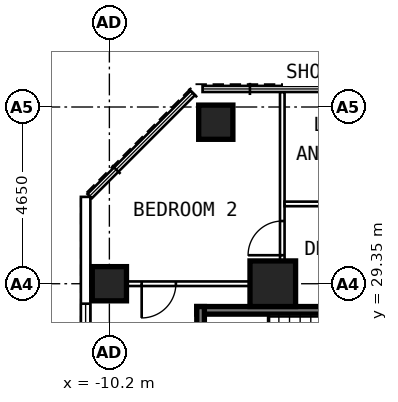
"""IFC4 building model, lengths in metres.
Left out: names, types, materials, properties, quantities, classifications, styles, units other than length and angle.
Written with IfcOpenShell. Run it as: python <this file> out.ifc"""

import sys

from ifc_helpers import new_model, si_unit, direction, frame, frame_2d, origin, origin_2d, place, context, subcontext, project, spatial, rectangle, extrude, element, fill, save


model = new_model("IFC4")
c1 = context("Model", 3, precision=1e-05, world=origin(), true_north=direction((0.0, 1.0)))
c2 = subcontext(c1, "Body", "Model", "MODEL_VIEW")
j1 = project(units=[si_unit("LENGTHUNIT", "METRE"), si_unit("PLANEANGLEUNIT", "RADIAN")], contexts=[c1])
p1 = place(None, origin())
s1 = spatial("IfcSite", under=j1, at=p1, CompositionType="ELEMENT")
p2 = place(p1, origin())
s2 = spatial("IfcBuilding", under=s1, at=p2, CompositionType="ELEMENT")
p3 = place(p2, frame((0.0, 0.0, 106.0)))
s3 = spatial("IfcBuildingStorey", under=s2, at=p3, CompositionType="ELEMENT", Elevation=106.0)
for number, where, z_axis, x_axis in (
    (1, (-10.2, 29.35, 0.0), (0.0, 0.0, 1.0), (0.0, 1.0, 0.0)),
    (2, (-7.4, 33.6, 0.0), (0.0, 0.0, 1.0), (0.0, 1.0, 0.0)),
):
    element("IfcColumn", number, at=place(p3, frame(where, z_axis=z_axis, x_axis=x_axis)), inside=s3, PredefinedType="COLUMN", context=c2, shape_type="SweptSolid", body=[
        extrude(rectangle(XDim=0.9, YDim=0.9, at=origin_2d()), origin(), (0.0, 0.0, 1.0), 3.6),
    ])
p4 = place(p3, frame((-5.9, 29.35, 0.0), z_axis=(0.0, 0.0, 1.0), x_axis=(0.0, 1.0, 0.0)))
e3 = element("IfcColumn", 3, at=p4, inside=s3, PredefinedType="COLUMN", context=c2, shape_type="SweptSolid", body=[
    extrude(rectangle(XDim=1.2, YDim=1.2, at=origin_2d()), origin(), (0.0, 0.0, 1.0), 3.6),
])
p5 = place(p3, frame((-10.825, 6.148, 0.0), z_axis=(0.0, 0.0, 1.0), x_axis=(0.0, 1.0, 0.0)))
e4 = element("IfcWall", 4, at=p5, inside=s3, PredefinedType="SOLIDWALL", context=c2, shape_type="SweptSolid", body=[
    extrude(rectangle(XDim=25.487, YDim=0.25, at=frame_2d((12.744, 0.0))), origin(), (0.0, 0.0, 1.0), 3.35),
])
p6 = place(p5, frame((0.927, 0.0, 0.8)))
e5 = element("IfcOpeningElement", 5, at=p6, cuts=e4, PredefinedType="OPENING", context=c2, shape_type="SweptSolid", body=[
    extrude(rectangle(XDim=1.8, YDim=1.8, at=frame_2d((0.9, 0.9))), frame((0.0, 0.137, 0.0), z_axis=(0.0, -1.0, 0.0), x_axis=(1.0, 0.0, 0.0)), (0.0, 0.0, 1.0), 0.274),
])
p7 = place(p5, frame((3.777, 0.0, 0.8)))
e6 = element("IfcOpeningElement", 6, at=p7, cuts=e4, PredefinedType="OPENING", context=c2, shape_type="SweptSolid", body=[
    extrude(rectangle(XDim=1.8, YDim=1.8, at=frame_2d((0.9, 0.9))), frame((0.0, 0.137, 0.0), z_axis=(0.0, -1.0, 0.0), x_axis=(1.0, 0.0, 0.0)), (0.0, 0.0, 1.0), 0.274),
])
p8 = place(p5, frame((6.627, 0.0, 0.8)))
e7 = element("IfcOpeningElement", 7, at=p8, cuts=e4, PredefinedType="OPENING", context=c2, shape_type="SweptSolid", body=[
    extrude(rectangle(XDim=1.8, YDim=1.8, at=frame_2d((0.9, 0.9))), frame((0.0, 0.137, 0.0), z_axis=(0.0, -1.0, 0.0), x_axis=(1.0, 0.0, 0.0)), (0.0, 0.0, 1.0), 0.274),
])
p9 = place(p5, frame((9.477, 0.0, 0.8)))
e8 = element("IfcOpeningElement", 8, at=p9, cuts=e4, PredefinedType="OPENING", context=c2, shape_type="SweptSolid", body=[
    extrude(rectangle(XDim=1.8, YDim=1.8, at=frame_2d((0.9, 0.9))), frame((0.0, 0.137, 0.0), z_axis=(0.0, -1.0, 0.0), x_axis=(1.0, 0.0, 0.0)), (0.0, 0.0, 1.0), 0.274),
])
p10 = place(p5, frame((12.327, 0.0, 0.8)))
e9 = element("IfcOpeningElement", 9, at=p10, cuts=e4, PredefinedType="OPENING", context=c2, shape_type="SweptSolid", body=[
    extrude(rectangle(XDim=1.8, YDim=1.8, at=frame_2d((0.9, 0.9))), frame((0.0, 0.137, 0.0), z_axis=(0.0, -1.0, 0.0), x_axis=(1.0, 0.0, 0.0)), (0.0, 0.0, 1.0), 0.274),
])
p11 = place(p5, frame((15.177, 0.0, 0.8)))
e10 = element("IfcOpeningElement", 10, at=p11, cuts=e4, PredefinedType="OPENING", context=c2, shape_type="SweptSolid", body=[
    extrude(rectangle(XDim=1.8, YDim=1.8, at=frame_2d((0.9, 0.9))), frame((0.0, 0.137, 0.0), z_axis=(0.0, -1.0, 0.0), x_axis=(1.0, 0.0, 0.0)), (0.0, 0.0, 1.0), 0.274),
])
p12 = place(p5, frame((18.027, 0.0, 0.8)))
e11 = element("IfcOpeningElement", 11, at=p12, cuts=e4, PredefinedType="OPENING", context=c2, shape_type="SweptSolid", body=[
    extrude(rectangle(XDim=1.8, YDim=1.8, at=frame_2d((0.9, 0.9))), frame((0.0, 0.137, 0.0), z_axis=(0.0, -1.0, 0.0), x_axis=(1.0, 0.0, 0.0)), (0.0, 0.0, 1.0), 0.274),
])
p13 = place(p5, frame((20.877, 0.0, 0.8)))
e12 = element("IfcOpeningElement", 12, at=p13, cuts=e4, PredefinedType="OPENING", context=c2, shape_type="SweptSolid", body=[
    extrude(rectangle(XDim=1.8, YDim=1.8, at=frame_2d((0.9, 0.9))), frame((0.0, 0.137, 0.0), z_axis=(0.0, -1.0, 0.0), x_axis=(1.0, 0.0, 0.0)), (0.0, 0.0, 1.0), 0.274),
])
p14 = place(p3, frame((-5.71, 29.35, 0.0), z_axis=(0.0, 0.0, 1.0), x_axis=(-1.0, 0.0, 0.0)))
e13 = element("IfcWall", 13, at=p14, inside=s3, PredefinedType="PARTITIONING", context=c2, shape_type="SweptSolid", body=[
    extrude(rectangle(XDim=4.99, YDim=0.12, at=frame_2d((2.495, 0.0))), origin(), (0.0, 0.0, 1.0), 2.45),
])
p15 = place(p14, frame((2.74, 0.0, 0.0)))
e14 = element("IfcOpeningElement", 14, at=p15, cuts=e13, PredefinedType="OPENING", context=c2, shape_type="SweptSolid", body=[
    extrude(rectangle(XDim=0.9, YDim=2.1, at=frame_2d((0.45, 1.05))), frame((0.0, 0.072, 0.0), z_axis=(0.0, -1.0, 0.0), x_axis=(1.0, 0.0, 0.0)), (0.0, 0.0, 1.0), 0.144),
])
p16 = place(p3, frame((-5.65, 28.95, 0.0), z_axis=(0.0, 0.0, 1.0), x_axis=(0.0, 1.0, 0.0)))
e15 = element("IfcWall", 15, at=p16, inside=s3, PredefinedType="PARTITIONING", context=c2, shape_type="SweptSolid", body=[
    extrude(rectangle(XDim=5.445, YDim=0.12, at=frame_2d((2.723, 0.0))), origin(), (0.0, 0.0, 1.0), 3.35),
])
p17 = place(p16, frame((1.15, 0.0, 0.0)))
e16 = element("IfcOpeningElement", 16, at=p17, cuts=e15, PredefinedType="OPENING", context=c2, shape_type="SweptSolid", body=[
    extrude(rectangle(XDim=0.9, YDim=2.1, at=frame_2d((0.45, 1.05))), frame((0.0, 0.072, 0.0), z_axis=(0.0, -1.0, 0.0), x_axis=(1.0, 0.0, 0.0)), (0.0, 0.0, 1.0), 0.144),
])
p18 = place(p3, frame((-2.1, 31.45, 0.0), z_axis=(0.0, 0.0, 1.0), x_axis=(-1.0, 0.0, 0.0)))
e17 = element("IfcWall", 17, at=p18, inside=s3, PredefinedType="PARTITIONING", context=c2, shape_type="SweptSolid", body=[
    extrude(rectangle(XDim=3.49, YDim=0.12, at=frame_2d((1.745, 0.0))), origin(), (0.0, 0.0, 1.0), 3.35),
])
p19 = place(p18, frame((1.345, 0.0, 0.0)))
e18 = element("IfcOpeningElement", 18, at=p19, cuts=e17, PredefinedType="OPENING", context=c2, shape_type="SweptSolid", body=[
    extrude(rectangle(XDim=0.8, YDim=2.1, at=frame_2d((0.4, 1.05))), frame((0.0, 0.072, 0.0), z_axis=(0.0, -1.0, 0.0), x_axis=(1.0, 0.0, 0.0)), (0.0, 0.0, 1.0), 0.144),
])
p20 = place(p3, frame((-2.1, 28.65, 0.0), z_axis=(0.0, 0.0, 1.0), x_axis=(-1.0, 0.0, 0.0)))
e19 = element("IfcWall", 19, at=p20, inside=s3, PredefinedType="SHEAR", context=c2, shape_type="SweptSolid", body=[
    extrude(rectangle(XDim=5.8, YDim=0.2, at=frame_2d((2.9, 0.0))), origin(), (0.0, 0.0, 1.0), 3.33),
])
p21 = place(p3, frame((-7.8, 24.75, 0.0), z_axis=(0.0, 0.0, 1.0), x_axis=(0.0, 1.0, 0.0)))
e20 = element("IfcWall", 20, at=p21, inside=s3, PredefinedType="SHEAR", context=c2, shape_type="SweptSolid", body=[
    extrude(rectangle(XDim=4.0, YDim=0.2, at=frame_2d((2.0, 0.0))), origin(), (0.0, 0.0, 1.0), 3.33),
])
p22 = place(p13, origin())
e21 = element("IfcWindow", 21, at=p22, inside=s3, PartitioningType="SINGLE_PANEL", PredefinedType="WINDOW", context=c2, shape_type="SweptSolid", body=[
    extrude(rectangle(XDim=1.8, YDim=1.8, at=frame_2d((0.9, 0.9))), frame((0.0, 0.03, 0.0), z_axis=(0.0, -1.0, 0.0), x_axis=(1.0, 0.0, 0.0)), (0.0, 0.0, 1.0), 0.06),
])
fill(e12, e21)
p23 = place(p15, origin())
e22 = element("IfcDoor", 22, at=p23, inside=s3, OperationType="SINGLE_SWING_RIGHT", PredefinedType="DOOR", context=c2, shape_type="SweptSolid", body=[
    extrude(rectangle(XDim=0.9, YDim=2.1, at=frame_2d((0.45, 1.05))), frame((0.0, 0.025, 0.0), z_axis=(0.0, -1.0, 0.0), x_axis=(1.0, 0.0, 0.0)), (0.0, 0.0, 1.0), 0.05),
])
fill(e14, e22)
p24 = place(p17, origin())
e23 = element("IfcDoor", 23, at=p24, inside=s3, OperationType="SINGLE_SWING_LEFT", PredefinedType="DOOR", context=c2, shape_type="SweptSolid", body=[
    extrude(rectangle(XDim=0.9, YDim=2.1, at=frame_2d((0.45, 1.05))), frame((0.0, 0.025, 0.0), z_axis=(0.0, -1.0, 0.0), x_axis=(1.0, 0.0, 0.0)), (0.0, 0.0, 1.0), 0.05),
])
fill(e16, e23)
save(model, sys.argv[1])
